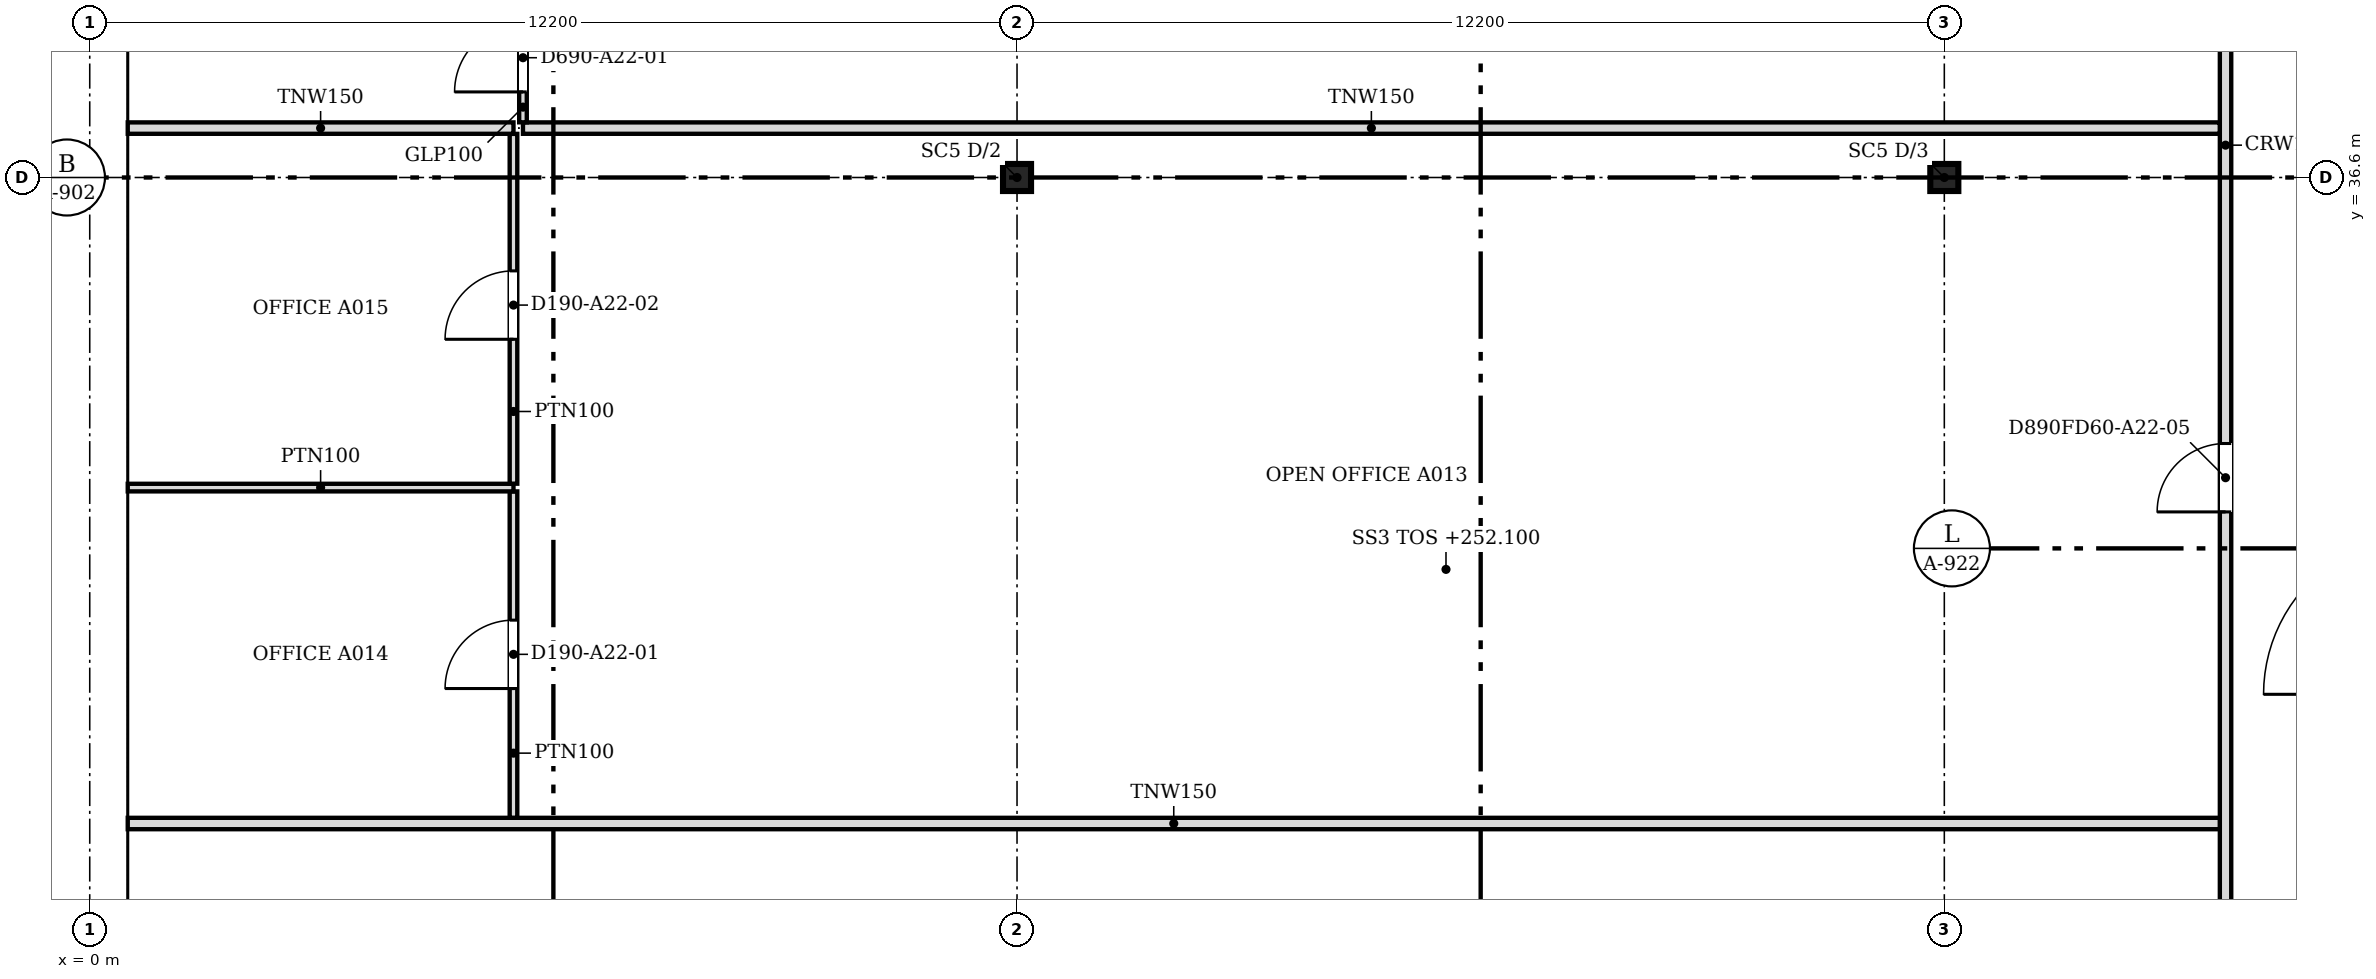
"""IFC4 building model, lengths in metres.
Left out: names, types, materials, properties, quantities, classifications, styles, units other than length and angle.
Written with IfcOpenShell. Run it as: python <this file> out.ifc"""

import sys

from ifc_helpers import new_model, si_unit, direction, frame, frame_2d, origin, origin_2d, place, context, subcontext, project, spatial, polyline, rectangle, i_section, outline, extrude, faceted_brep, source, transform, mapped, element, fill, save


model = new_model("IFC4")
c1 = context("Model", 3, precision=1e-05, world=origin(), true_north=direction((0.0, 1.0)))
c2 = subcontext(c1, "Body", "Model", "MODEL_VIEW")
j1 = project(units=[si_unit("LENGTHUNIT", "METRE"), si_unit("PLANEANGLEUNIT", "RADIAN")], contexts=[c1])
p1 = place(None, origin())
s1 = spatial("IfcSite", under=j1, at=p1, CompositionType="ELEMENT")
p2 = place(p1, origin())
s2 = spatial("IfcBuilding", under=s1, at=p2, CompositionType="ELEMENT")
p3 = place(p2, frame((0.0, 0.0, 252.1)))
s3 = spatial("IfcBuildingStorey", under=s2, at=p3, CompositionType="ELEMENT", Elevation=252.1)
for number, where, z_axis, x_axis in (
    (1, (12.2, 36.6, 0.0), (0.0, 0.0, 1.0), (1.0, 0.0, 0.0)),
    (2, (24.4, 36.6, 0.0), (0.0, 0.0, 1.0), (1.0, 0.0, 0.0)),
):
    element("IfcColumn", number, at=place(p3, frame(where, z_axis=z_axis, x_axis=x_axis)), inside=s3, PredefinedType="COLUMN", context=c2, shape_type="SweptSolid", body=[
        extrude(i_section(OverallWidth=0.369, OverallDepth=0.356, WebThickness=0.011, FlangeThickness=0.018, at=origin_2d()), origin(), (0.0, 0.0, 1.0), 3.6),
    ])
m1 = source(origin(), c2, "Body", "Brep", [
    faceted_brep([(3.05, -0.25, 0.0), (6.1, -0.25, 3.8), (6.1, -0.25, 3.8), (3.05, -0.25, 7.6), (0.0, -0.25, 3.8), (0.0, 0.25, 3.8), (3.05, 0.25, 7.6), (6.1, 0.25, 3.8), (6.1, 0.25, 3.8), (3.05, 0.25, 0.0)], [[[0, 1, 2, 3, 4]], [[5, 6, 7, 8, 9]], [[9, 8, 1, 0]], [[7, 6, 3, 2]], [[6, 5, 4, 3]], [[5, 9, 0, 4]], [[1, 8, 7, 2]]]),
])
p4 = place(p3, frame((0.25, 42.7, -3.8), z_axis=(0.0, 0.0, 1.0), x_axis=(0.0, -1.0, 0.0)))
e3 = element("IfcWall", 3, at=p4, inside=s3, PredefinedType="SOLIDWALL", context=c2, shape_type="MappedRepresentation", body=[
    mapped(m1, transform((0.0, 0.0, 0.0), scale=1.0)),
])
m2 = source(origin(), c2, "Body", "SweptSolid", [
    extrude(outline(polyline([(3.05, 0.399), (5.78, 3.8), (3.05, 7.2), (0.321, 3.8), (3.05, 0.399)])), frame((0.0, 0.26, 0.0), z_axis=(0.0, -1.0, 0.0), x_axis=(1.0, 0.0, 0.0)), (0.0, 0.0, 1.0), 0.52),
])
p5 = place(p4, origin())
e4 = element("IfcOpeningElement", 4, at=p5, cuts=e3, PredefinedType="OPENING", context=c2, shape_type="MappedRepresentation", body=[
    mapped(m2, transform((0.0, 0.0, 0.0), scale=1.0)),
])
m3 = source(origin(), c2, "Body", "SweptSolid", [
    extrude(outline(polyline([(3.05, 0.0), (6.1, 3.8), (3.05, 7.6), (0.0, 3.8), (3.05, 0.0)])), frame((0.0, 0.25, 0.0), z_axis=(0.0, -1.0, 0.0), x_axis=(1.0, 0.0, 0.0)), (0.0, 0.0, 1.0), 0.5),
])
p6 = place(p3, frame((0.25, 36.6, -3.8), z_axis=(0.0, 0.0, 1.0), x_axis=(0.0, -1.0, 0.0)))
e5 = element("IfcWall", 5, at=p6, inside=s3, PredefinedType="SOLIDWALL", context=c2, shape_type="MappedRepresentation", body=[
    mapped(m3, transform((0.0, 0.0, 0.0), scale=1.0)),
])
p7 = place(p6, origin())
e6 = element("IfcOpeningElement", 6, at=p7, cuts=e5, PredefinedType="OPENING", context=c2, shape_type="MappedRepresentation", body=[
    mapped(m2, transform((0.0, 0.0, 0.0), scale=1.0)),
])
m4 = source(origin(), c2, "Body", "Brep", [
    faceted_brep([(3.05, -0.25, 0.0), (6.053, -0.25, 3.8), (3.05, -0.25, 7.6), (0.0, -0.25, 3.8), (0.0, 0.25, 3.8), (3.05, 0.25, 7.6), (6.007, 0.25, 3.859), (6.007, 0.25, 3.741), (3.05, 0.25, 0.0), (6.053, 0.0, 3.8)], [[[0, 1, 2, 3]], [[4, 5, 6, 7, 8]], [[8, 7, 9, 1, 0]], [[6, 5, 2, 1, 9]], [[5, 4, 3, 2]], [[4, 8, 0, 3]], [[7, 6, 9]]]),
])
p8 = place(p3, frame((0.25, 30.5, -3.8), z_axis=(0.0, 0.0, 1.0), x_axis=(0.0, -1.0, 0.0)))
e7 = element("IfcWall", 7, at=p8, inside=s3, PredefinedType="SOLIDWALL", context=c2, shape_type="MappedRepresentation", body=[
    mapped(m4, transform((0.0, 0.0, 0.0), scale=1.0)),
])
m5 = source(origin(), c2, "Body", "SweptSolid", [
    extrude(outline(polyline([(3.049, 0.401), (5.735, 3.8), (3.049, 7.199), (0.321, 3.8), (3.049, 0.401)])), frame((0.0, 0.26, 0.0), z_axis=(0.0, -1.0, 0.0), x_axis=(1.0, 0.0, 0.0)), (0.0, 0.0, 1.0), 0.52),
])
p9 = place(p8, origin())
e8 = element("IfcOpeningElement", 8, at=p9, cuts=e7, PredefinedType="OPENING", context=c2, shape_type="MappedRepresentation", body=[
    mapped(m5, transform((0.0, 0.0, 0.0), scale=1.0)),
])
p10 = place(p2, frame((0.0, 0.0, 255.9)))
s4 = spatial("IfcBuildingStorey", under=s2, at=p10, CompositionType="ELEMENT", Elevation=255.9)
m6 = source(origin(), c2, "Body", "Brep", [
    faceted_brep([(3.05, -0.25, 0.0), (6.1, -0.25, 3.8), (6.1, -0.25, 3.8), (3.05, -0.25, 7.6), (0.0, -0.25, 3.8), (0.0, 0.25, 3.8), (3.05, 0.25, 7.6), (6.1, 0.25, 3.8), (6.1, 0.25, 3.8), (3.05, 0.25, 0.0)], [[[0, 1, 2, 3, 4]], [[5, 6, 7, 8, 9]], [[9, 8, 1, 0]], [[7, 6, 3, 2]], [[6, 5, 4, 3]], [[5, 9, 0, 4]], [[1, 8, 7, 2]]]),
])
p11 = place(p10, frame((0.25, 39.65, -3.8), z_axis=(0.0, 0.0, 1.0), x_axis=(0.0, -1.0, 0.0)))
e9 = element("IfcWall", 9, at=p11, inside=s4, PredefinedType="SOLIDWALL", context=c2, shape_type="MappedRepresentation", body=[
    mapped(m6, transform((0.0, 0.0, 0.0), scale=1.0)),
])
m7 = source(origin(), c2, "Body", "SweptSolid", [
    extrude(outline(polyline([(3.05, 0.399), (5.78, 3.8), (3.05, 7.2), (0.321, 3.8), (3.05, 0.399)])), frame((0.0, 0.26, 0.0), z_axis=(0.0, -1.0, 0.0), x_axis=(1.0, 0.0, 0.0)), (0.0, 0.0, 1.0), 0.52),
])
p12 = place(p11, origin())
e10 = element("IfcOpeningElement", 10, at=p12, cuts=e9, PredefinedType="OPENING", context=c2, shape_type="MappedRepresentation", body=[
    mapped(m7, transform((0.0, 0.0, 0.0), scale=1.0)),
])
m8 = source(origin(), c2, "Body", "SweptSolid", [
    extrude(outline(polyline([(3.05, 0.0), (6.1, 3.8), (3.05, 7.6), (0.0, 3.8), (3.05, 0.0)])), frame((0.0, 0.25, 0.0), z_axis=(0.0, -1.0, 0.0), x_axis=(1.0, 0.0, 0.0)), (0.0, 0.0, 1.0), 0.5),
])
p13 = place(p10, frame((0.25, 33.55, -3.8), z_axis=(0.0, 0.0, 1.0), x_axis=(0.0, -1.0, 0.0)))
e11 = element("IfcWall", 11, at=p13, inside=s4, PredefinedType="SOLIDWALL", context=c2, shape_type="MappedRepresentation", body=[
    mapped(m8, transform((0.0, 0.0, 0.0), scale=1.0)),
])
p14 = place(p13, origin())
e12 = element("IfcOpeningElement", 12, at=p14, cuts=e11, PredefinedType="OPENING", context=c2, shape_type="MappedRepresentation", body=[
    mapped(m7, transform((0.0, 0.0, 0.0), scale=1.0)),
])
m9 = source(origin(), c2, "Body", "Brep", [
    faceted_brep([(3.003, -0.25, 0.0), (3.05, -0.25, 0.06), (3.05, -0.25, 7.54), (3.003, -0.25, 7.6), (0.0, -0.25, 3.8), (0.0, 0.25, 3.8), (2.957, 0.25, 7.541), (2.957, 0.25, 0.059), (3.003, 0.0, 0.0), (3.003, 0.0, 7.6)], [[[0, 1, 2, 3, 4]], [[5, 6, 7]], [[1, 0, 8]], [[9, 3, 2]], [[6, 5, 4, 3, 9]], [[5, 7, 8, 0, 4]], [[1, 8, 7, 6, 9, 2]]]),
])
p15 = place(p10, frame((0.25, 27.45, -3.8), z_axis=(0.0, 0.0, 1.0), x_axis=(0.0, -1.0, 0.0)))
e13 = element("IfcWall", 13, at=p15, inside=s4, PredefinedType="SOLIDWALL", context=c2, shape_type="MappedRepresentation", body=[
    mapped(m9, transform((0.0, 0.0, 0.0), scale=1.0)),
])
m10 = source(origin(), c2, "Body", "SweptSolid", [
    extrude(outline(polyline([(2.803, 6.944), (0.319, 3.8), (2.803, 0.656), (2.803, 6.944)])), frame((0.0, 0.26, 0.0), z_axis=(0.0, -1.0, 0.0), x_axis=(1.0, 0.0, 0.0)), (0.0, 0.0, 1.0), 0.52),
])
p16 = place(p15, origin())
e14 = element("IfcOpeningElement", 14, at=p16, cuts=e13, PredefinedType="OPENING", context=c2, shape_type="MappedRepresentation", body=[
    mapped(m10, transform((0.0, 0.0, 0.0), scale=1.0)),
])
p17 = place(p3, frame((28.1, 22.076, 0.0), z_axis=(0.0, 0.0, 1.0), x_axis=(0.0, 1.0, 0.0)))
e15 = element("IfcWall", 15, at=p17, inside=s3, PredefinedType="PARTITIONING", context=c2, shape_type="SweptSolid", body=[
    extrude(rectangle(XDim=23.548, YDim=0.15, at=frame_2d((11.774, 0.0))), origin(), (0.0, 0.0, 1.0), 3.067),
])
m11 = source(origin(), c2, "Body", "SweptSolid", [
    extrude(rectangle(XDim=1.0, YDim=2.1, at=frame_2d((0.5, 1.05))), frame((0.0, 0.085, 0.0), z_axis=(0.0, -1.0, 0.0), x_axis=(1.0, 0.0, 0.0)), (0.0, 0.0, 1.0), 0.17),
])
p18 = place(p17, frame((2.5, 0.0, 0.0)))
e16 = element("IfcOpeningElement", 16, at=p18, cuts=e15, PredefinedType="OPENING", context=c2, shape_type="MappedRepresentation", body=[
    mapped(m11, transform((0.0, 0.0, 0.0), scale=1.0)),
])
m12 = source(origin(), c2, "Body", "SweptSolid", [
    extrude(rectangle(XDim=0.9, YDim=2.1, at=frame_2d((0.45, 1.05))), frame((0.0, 0.085, 0.0), z_axis=(0.0, -1.0, 0.0), x_axis=(1.0, 0.0, 0.0)), (0.0, 0.0, 1.0), 0.17),
])
p19 = place(p17, frame((18.875, 0.0, 0.0)))
e17 = element("IfcOpeningElement", 17, at=p19, cuts=e15, PredefinedType="OPENING", context=c2, shape_type="MappedRepresentation", body=[
    mapped(m12, transform((0.0, 0.0, 0.0), scale=1.0)),
])
p20 = place(p17, frame((10.124, 0.0, 0.0)))
e18 = element("IfcOpeningElement", 18, at=p20, cuts=e15, PredefinedType="OPENING", context=c2, shape_type="MappedRepresentation", body=[
    mapped(m12, transform((0.0, 0.0, 0.0), scale=1.0)),
])
p21 = place(p3, frame((0.5, 28.1, 0.0), z_axis=(0.0, 0.0, 1.0), x_axis=(1.0, 0.0, 0.0)))
e19 = element("IfcWall", 19, at=p21, inside=s3, PredefinedType="PARTITIONING", context=c2, shape_type="SweptSolid", body=[
    extrude(rectangle(XDim=27.524, YDim=0.15, at=frame_2d((13.762, 0.0))), origin(), (0.0, 0.0, 1.0), 3.067),
])
p22 = place(p3, frame((5.575, 28.176, 0.0), z_axis=(0.0, 0.0, 1.0), x_axis=(0.0, 1.0, 0.0)))
e20 = element("IfcWall", 20, at=p22, inside=s3, PredefinedType="PARTITIONING", context=c2, shape_type="SweptSolid", body=[
    extrude(rectangle(XDim=4.293, YDim=0.1, at=frame_2d((2.146, 0.0))), origin(), (0.0, 0.0, 1.0), 3.067),
])
m13 = source(origin(), c2, "Body", "SweptSolid", [
    extrude(rectangle(XDim=0.9, YDim=2.1, at=frame_2d((0.45, 1.05))), frame((0.0, 0.06, 0.0), z_axis=(0.0, -1.0, 0.0), x_axis=(1.0, 0.0, 0.0)), (0.0, 0.0, 1.0), 0.12),
])
p23 = place(p22, frame((1.7, 0.0, 0.0)))
e21 = element("IfcOpeningElement", 21, at=p23, cuts=e20, PredefinedType="OPENING", context=c2, shape_type="MappedRepresentation", body=[
    mapped(m13, transform((0.0, 0.0, 0.0), scale=1.0)),
])
p24 = place(p3, frame((0.5, 32.52, 0.0), z_axis=(0.0, 0.0, 1.0), x_axis=(1.0, 0.0, 0.0)))
e22 = element("IfcWall", 22, at=p24, inside=s3, PredefinedType="PARTITIONING", context=c2, shape_type="SweptSolid", body=[
    extrude(rectangle(XDim=5.075, YDim=0.1, at=frame_2d((2.538, 0.0))), origin(), (0.0, 0.0, 1.0), 3.067),
])
p25 = place(p3, frame((5.575, 32.571, 0.0), z_axis=(0.0, 0.0, 1.0), x_axis=(0.0, 1.0, 0.0)))
e23 = element("IfcWall", 23, at=p25, inside=s3, PredefinedType="PARTITIONING", context=c2, shape_type="SweptSolid", body=[
    extrude(rectangle(XDim=4.603, YDim=0.1, at=frame_2d((2.301, 0.0))), origin(), (0.0, 0.0, 1.0), 3.067),
])
p26 = place(p25, frame((1.9, 0.0, 0.0)))
e24 = element("IfcOpeningElement", 24, at=p26, cuts=e23, PredefinedType="OPENING", context=c2, shape_type="MappedRepresentation", body=[
    mapped(m13, transform((0.0, 0.0, 0.0), scale=1.0)),
])
p27 = place(p3, frame((0.5, 37.25, 0.0), z_axis=(0.0, 0.0, 1.0), x_axis=(1.0, 0.0, 0.0)))
e25 = element("IfcWall", 25, at=p27, inside=s3, PredefinedType="PARTITIONING", context=c2, shape_type="SweptSolid", body=[
    extrude(rectangle(XDim=5.075, YDim=0.15, at=frame_2d((2.538, 0.0))), origin(), (0.0, 0.0, 1.0), 3.067),
])
p28 = place(p3, frame((5.7, 37.25, 0.0), z_axis=(0.0, 0.0, 1.0), x_axis=(1.0, 0.0, 0.0)))
e26 = element("IfcWall", 26, at=p28, inside=s3, PredefinedType="PARTITIONING", context=c2, shape_type="SweptSolid", body=[
    extrude(rectangle(XDim=22.324, YDim=0.15, at=frame_2d((11.162, 0.0))), origin(), (0.0, 0.0, 1.0), 3.067),
])
p29 = place(p3, frame((5.7, 37.326, 0.0), z_axis=(0.0, 0.0, 1.0), x_axis=(0.0, 1.0, 0.0)))
e27 = element("IfcWall", 27, at=p29, inside=s3, PredefinedType="PARTITIONING", context=c2, shape_type="SweptSolid", body=[
    extrude(rectangle(XDim=1.674, YDim=0.1, at=frame_2d((0.837, 0.0))), origin(), (0.0, 0.0, 1.0), 3.067),
])
p30 = place(p29, frame((0.4, 0.0, 0.0)))
e28 = element("IfcOpeningElement", 28, at=p30, cuts=e27, PredefinedType="OPENING", context=c2, shape_type="MappedRepresentation", body=[
    mapped(m13, transform((0.0, 0.0, 0.0), scale=1.0)),
])
m14 = source(origin(), c2, "Body", "SweptSolid", [
    extrude(rectangle(XDim=0.9, YDim=2.1, at=frame_2d((0.45, 1.05))), frame((0.0, 0.025, 0.0), z_axis=(0.0, -1.0, 0.0), x_axis=(1.0, 0.0, 0.0)), (0.0, 0.0, 1.0), 0.05),
])
p31 = place(p30, origin())
e29 = element("IfcDoor", 29, at=p31, inside=s3, OperationType="SINGLE_SWING_LEFT", PredefinedType="DOOR", context=c2, shape_type="MappedRepresentation", body=[
    mapped(m14, transform((0.0, 0.0, 0.0), scale=1.0)),
])
fill(e28, e29)
p32 = place(p23, origin())
e30 = element("IfcDoor", 30, at=p32, inside=s3, OperationType="SINGLE_SWING_LEFT", PredefinedType="DOOR", context=c2, shape_type="MappedRepresentation", body=[
    mapped(m14, transform((0.0, 0.0, 0.0), scale=1.0)),
])
fill(e21, e30)
p33 = place(p26, origin())
e31 = element("IfcDoor", 31, at=p33, inside=s3, OperationType="SINGLE_SWING_LEFT", PredefinedType="DOOR", context=c2, shape_type="MappedRepresentation", body=[
    mapped(m14, transform((0.0, 0.0, 0.0), scale=1.0)),
])
fill(e24, e31)
p34 = place(p20, origin())
e32 = element("IfcDoor", 32, at=p34, inside=s3, OperationType="SINGLE_SWING_LEFT", PredefinedType="DOOR", context=c2, shape_type="MappedRepresentation", body=[
    mapped(m14, transform((0.0, 0.0, 0.0), scale=1.0)),
])
fill(e18, e32)
save(model, sys.argv[1])
